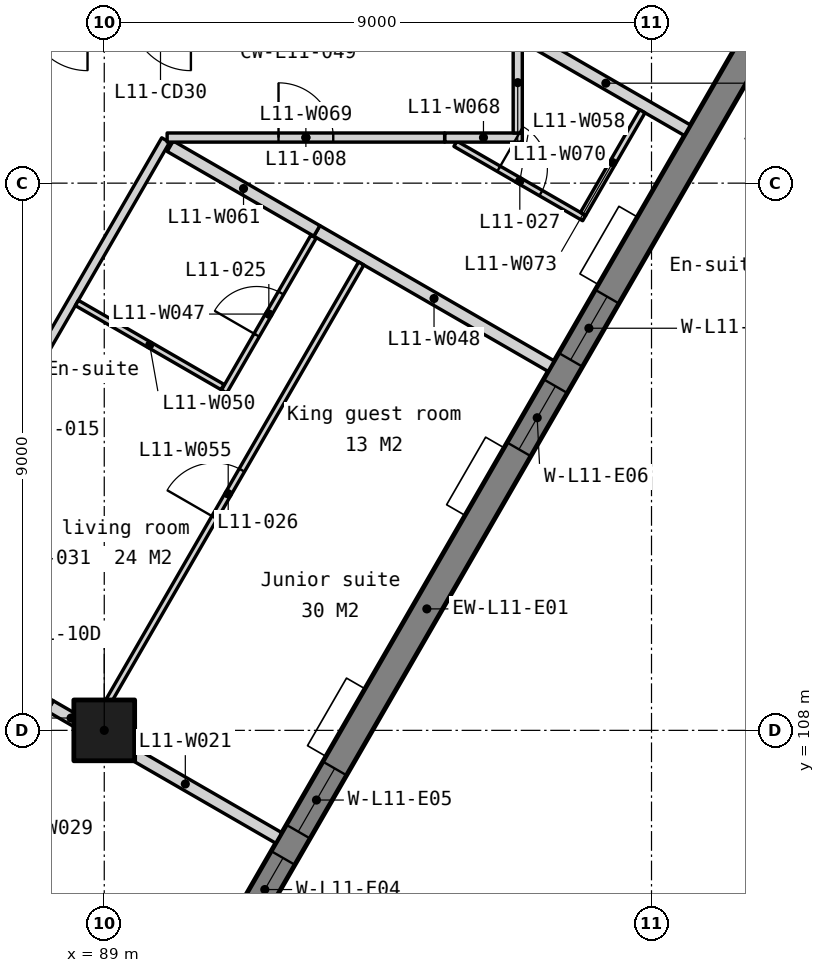
"""IFC4 building model, lengths in metres.
Left out: names, types, materials, properties, quantities, classifications, styles, units other than length and angle.
Written with IfcOpenShell. Run it as: python <this file> out.ifc"""

import sys

from ifc_helpers import new_model, si_unit, direction, frame, frame_2d, origin, origin_2d, place, context, subcontext, project, spatial, polyline, rectangle, outline, extrude, element, fill, save


model = new_model("IFC4")
c1 = context("Model", 3, precision=1e-05, world=origin(), true_north=direction((0.0, 1.0)))
c2 = subcontext(c1, "Body", "Model", "MODEL_VIEW")
j1 = project(units=[si_unit("LENGTHUNIT", "METRE"), si_unit("PLANEANGLEUNIT", "RADIAN")], contexts=[c1])
p1 = place(None, origin())
s1 = spatial("IfcSite", under=j1, at=p1, CompositionType="ELEMENT")
p2 = place(p1, origin())
s2 = spatial("IfcBuilding", under=s1, at=p2, CompositionType="ELEMENT")
p3 = place(p2, frame((0.0, 0.0, 52.5)))
s3 = spatial("IfcBuildingStorey", under=s2, at=p3, CompositionType="ELEMENT", Elevation=52.5)
p4 = place(p3, frame((89.0, 108.0, 0.0), z_axis=(0.0, 0.0, 1.0), x_axis=(1.0, 0.0, 0.0)))
e1 = element("IfcColumn", 1, at=p4, inside=s3, PredefinedType="COLUMN", context=c2, shape_type="SweptSolid", body=[
    extrude(rectangle(XDim=1.0, YDim=1.0, at=origin_2d()), origin(), (0.0, 0.0, 1.0), 3.5),
])
p5 = place(p3, frame((83.105, 90.599, -0.15), z_axis=(0.0, 0.0, 1.0), x_axis=(0.499999201451, 0.866025864826, 0.0)))
e2 = element("IfcWall", 2, at=p5, inside=s3, PredefinedType="SOLIDWALL", context=c2, shape_type="SweptSolid", body=[
    extrude(outline(polyline([(44.8, 0.0), (44.8, 3.5), (0.0, 3.5), (0.0, 0.0), (44.8, 0.0)])), frame((0.0, 0.225, 0.0), z_axis=(0.0, -1.0, 0.0), x_axis=(1.0, 0.0, 0.0)), (0.0, 0.0, 1.0), 0.45),
])
p6 = place(p5, frame((0.722, 0.0, 1.05)))
e3 = element("IfcOpeningElement", 3, at=p6, cuts=e2, PredefinedType="OPENING", context=c2, shape_type="SweptSolid", body=[
    extrude(rectangle(XDim=1.2, YDim=1.5, at=frame_2d((0.6, 0.75))), frame((0.0, 0.235, 0.0), z_axis=(0.0, -1.0, 0.0), x_axis=(1.0, 0.0, 0.0)), (0.0, 0.0, 1.0), 0.47),
])
p7 = place(p5, frame((7.51, 0.0, 1.05)))
e4 = element("IfcOpeningElement", 4, at=p7, cuts=e2, PredefinedType="OPENING", context=c2, shape_type="SweptSolid", body=[
    extrude(rectangle(XDim=1.2, YDim=1.5, at=frame_2d((0.6, 0.75))), frame((0.0, 0.235, 0.0), z_axis=(0.0, -1.0, 0.0), x_axis=(1.0, 0.0, 0.0)), (0.0, 0.0, 1.0), 0.47),
])
p8 = place(p5, frame((9.21, 0.0, 1.05)))
e5 = element("IfcOpeningElement", 5, at=p8, cuts=e2, PredefinedType="OPENING", context=c2, shape_type="SweptSolid", body=[
    extrude(rectangle(XDim=1.2, YDim=1.5, at=frame_2d((0.6, 0.75))), frame((0.0, 0.235, 0.0), z_axis=(0.0, -1.0, 0.0), x_axis=(1.0, 0.0, 0.0)), (0.0, 0.0, 1.0), 0.47),
])
p9 = place(p5, frame((16.47, 0.0, 1.05)))
e6 = element("IfcOpeningElement", 6, at=p9, cuts=e2, PredefinedType="OPENING", context=c2, shape_type="SweptSolid", body=[
    extrude(rectangle(XDim=1.2, YDim=1.5, at=frame_2d((0.6, 0.75))), frame((0.0, 0.235, 0.0), z_axis=(0.0, -1.0, 0.0), x_axis=(1.0, 0.0, 0.0)), (0.0, 0.0, 1.0), 0.47),
])
p10 = place(p5, frame((18.17, 0.0, 1.05)))
e7 = element("IfcOpeningElement", 7, at=p10, cuts=e2, PredefinedType="OPENING", context=c2, shape_type="SweptSolid", body=[
    extrude(rectangle(XDim=1.2, YDim=1.5, at=frame_2d((0.6, 0.75))), frame((0.0, 0.235, 0.0), z_axis=(0.0, -1.0, 0.0), x_axis=(1.0, 0.0, 0.0)), (0.0, 0.0, 1.0), 0.47),
])
p11 = place(p5, frame((25.43, 0.0, 1.05)))
e8 = element("IfcOpeningElement", 8, at=p11, cuts=e2, PredefinedType="OPENING", context=c2, shape_type="SweptSolid", body=[
    extrude(rectangle(XDim=1.2, YDim=1.5, at=frame_2d((0.6, 0.75))), frame((0.0, 0.235, 0.0), z_axis=(0.0, -1.0, 0.0), x_axis=(1.0, 0.0, 0.0)), (0.0, 0.0, 1.0), 0.47),
])
p12 = place(p5, frame((27.13, 0.0, 1.05)))
e9 = element("IfcOpeningElement", 9, at=p12, cuts=e2, PredefinedType="OPENING", context=c2, shape_type="SweptSolid", body=[
    extrude(rectangle(XDim=1.2, YDim=1.5, at=frame_2d((0.6, 0.75))), frame((0.0, 0.235, 0.0), z_axis=(0.0, -1.0, 0.0), x_axis=(1.0, 0.0, 0.0)), (0.0, 0.0, 1.0), 0.47),
])
p13 = place(p5, frame((34.39, 0.0, 1.05)))
e10 = element("IfcOpeningElement", 10, at=p13, cuts=e2, PredefinedType="OPENING", context=c2, shape_type="SweptSolid", body=[
    extrude(rectangle(XDim=1.2, YDim=1.5, at=frame_2d((0.6, 0.75))), frame((0.0, 0.235, 0.0), z_axis=(0.0, -1.0, 0.0), x_axis=(1.0, 0.0, 0.0)), (0.0, 0.0, 1.0), 0.47),
])
p14 = place(p5, frame((36.09, 0.0, 1.05)))
e11 = element("IfcOpeningElement", 11, at=p14, cuts=e2, PredefinedType="OPENING", context=c2, shape_type="SweptSolid", body=[
    extrude(rectangle(XDim=1.2, YDim=1.5, at=frame_2d((0.6, 0.75))), frame((0.0, 0.235, 0.0), z_axis=(0.0, -1.0, 0.0), x_axis=(1.0, 0.0, 0.0)), (0.0, 0.0, 1.0), 0.47),
])
p15 = place(p5, frame((42.878, 0.0, 1.05)))
e12 = element("IfcOpeningElement", 12, at=p15, cuts=e2, PredefinedType="OPENING", context=c2, shape_type="SweptSolid", body=[
    extrude(rectangle(XDim=1.2, YDim=1.5, at=frame_2d((0.6, 0.75))), frame((0.0, 0.235, 0.0), z_axis=(0.0, -1.0, 0.0), x_axis=(1.0, 0.0, 0.0)), (0.0, 0.0, 1.0), 0.47),
])
p16 = place(p3, frame((83.339, 105.983, 0.0), z_axis=(0.0, 0.0, 1.0), x_axis=(0.866023858256, -0.500002676924, 0.0)))
e13 = element("IfcWall", 13, at=p16, inside=s3, PredefinedType="PARTITIONING", context=c2, shape_type="SweptSolid", body=[
    extrude(rectangle(XDim=7.265, YDim=0.2, at=frame_2d((3.633, 0.0))), origin(), (0.0, 0.0, 1.0), 3.35),
])
p17 = place(p3, frame((88.796, 108.005, 0.0), z_axis=(0.0, 0.0, 1.0), x_axis=(0.8660424351, -0.499970499736, 0.0)))
e14 = element("IfcWall", 14, at=p17, inside=s3, PredefinedType="PARTITIONING", context=c2, shape_type="SweptSolid", body=[
    extrude(rectangle(XDim=3.55, YDim=0.2, at=frame_2d((1.775, 0.0))), origin(), (0.0, 0.0, 1.0), 3.35),
])
p18 = place(p3, frame((88.112, 108.4, 0.0), z_axis=(0.0, 0.0, 1.0), x_axis=(0.865989998118, -0.500061319399, 0.0)))
e15 = element("IfcWall", 15, at=p18, inside=s3, PredefinedType="PARTITIONING", context=c2, shape_type="SweptSolid", body=[
    extrude(rectangle(XDim=0.79, YDim=0.2, at=frame_2d((0.395, 0.0))), origin(), (0.0, 0.0, 1.0), 3.35),
])
p19 = place(p3, frame((85.579, 109.863, 0.0), z_axis=(0.0, 0.0, 1.0), x_axis=(0.86601045545, -0.500025890382, 0.0)))
e16 = element("IfcWall", 16, at=p19, inside=s3, PredefinedType="PARTITIONING", context=c2, shape_type="SweptSolid", body=[
    extrude(rectangle(XDim=2.925, YDim=0.2, at=frame_2d((1.462, 0.0))), origin(), (0.0, 0.0, 1.0), 3.35),
])
p20 = place(p3, frame((85.505, 109.906, 0.0), z_axis=(0.0, 0.0, 1.0), x_axis=(0.500017993482, 0.866015014994, 0.0)))
e17 = element("IfcWall", 17, at=p20, inside=s3, PredefinedType="PARTITIONING", context=c2, shape_type="SweptSolid", body=[
    extrude(rectangle(XDim=9.01, YDim=0.15, at=frame_2d((4.505, 0.0))), origin(), (0.0, 0.0, 1.0), 3.35),
])
p21 = place(p20, frame((4.005, 0.0, 0.0)))
e18 = element("IfcOpeningElement", 18, at=p21, cuts=e17, PredefinedType="OPENING", context=c2, shape_type="SweptSolid", body=[
    extrude(rectangle(XDim=1.0, YDim=2.1, at=frame_2d((0.5, 1.05))), frame((0.0, 0.085, 0.0), z_axis=(0.0, -1.0, 0.0), x_axis=(1.0, 0.0, 0.0)), (0.0, 0.0, 1.0), 0.17),
])
p22 = place(p3, frame((90.971, 113.574, 0.0), z_axis=(0.0, 0.0, 1.0), x_axis=(0.499988418424, 0.866032090307, 0.0)))
e19 = element("IfcWall", 19, at=p22, inside=s3, PredefinedType="PARTITIONING", context=c2, shape_type="SweptSolid", body=[
    extrude(rectangle(XDim=2.94, YDim=0.1, at=frame_2d((1.47, 0.0))), origin(), (0.0, 0.0, 1.0), 3.35),
])
p23 = place(p22, frame((1.07, 0.0, 0.0)))
e20 = element("IfcOpeningElement", 20, at=p23, cuts=e19, PredefinedType="OPENING", context=c2, shape_type="SweptSolid", body=[
    extrude(rectangle(XDim=0.8, YDim=2.1, at=frame_2d((0.4, 1.05))), frame((0.0, 0.06, 0.0), z_axis=(0.0, -1.0, 0.0), x_axis=(1.0, 0.0, 0.0)), (0.0, 0.0, 1.0), 0.12),
])
p24 = place(p3, frame((92.497, 116.215, 0.0), z_axis=(0.0, 0.0, 1.0), x_axis=(0.866012907634, -0.500021643343, 0.0)))
e21 = element("IfcWall", 21, at=p24, inside=s3, PredefinedType="PARTITIONING", context=c2, shape_type="SweptSolid", body=[
    extrude(rectangle(XDim=4.45, YDim=0.2, at=frame_2d((2.225, 0.0))), origin(), (0.0, 0.0, 1.0), 3.35),
])
p25 = place(p3, frame((88.55, 115.03, 0.0), z_axis=(0.0, 0.0, 1.0), x_axis=(0.866012076814, -0.50002308228, 0.0)))
e22 = element("IfcWall", 22, at=p25, inside=s3, PredefinedType="PARTITIONING", context=c2, shape_type="SweptSolid", body=[
    extrude(rectangle(XDim=2.765, YDim=0.1, at=frame_2d((1.382, 0.0))), origin(), (0.0, 0.0, 1.0), 3.35),
])
p26 = place(p3, frame((88.851, 108.101, 0.0), z_axis=(0.0, 0.0, 1.0), x_axis=(0.500004234368, 0.866022959057, 0.0)))
e23 = element("IfcWall", 23, at=p26, inside=s3, PredefinedType="PARTITIONING", context=c2, shape_type="SweptSolid", body=[
    extrude(rectangle(XDim=8.75, YDim=0.1, at=frame_2d((4.375, 0.0))), origin(), (0.0, 0.0, 1.0), 3.35),
])
p27 = place(p26, frame((3.925, 0.0, 0.0)))
e24 = element("IfcOpeningElement", 24, at=p27, cuts=e23, PredefinedType="OPENING", context=c2, shape_type="SweptSolid", body=[
    extrude(rectangle(XDim=0.9, YDim=2.1, at=frame_2d((0.45, 1.05))), frame((0.0, 0.06, 0.0), z_axis=(0.0, -1.0, 0.0), x_axis=(1.0, 0.0, 0.0)), (0.0, 0.0, 1.0), 0.12),
])
p28 = place(p3, frame((94.775, 117.647, 0.0), z_axis=(0.0, 0.0, 1.0), x_axis=(0.86604092097, -0.499973122483, 0.0)))
e25 = element("IfcWall", 25, at=p28, inside=s3, PredefinedType="PARTITIONING", context=c2, shape_type="SweptSolid", body=[
    extrude(rectangle(XDim=2.445, YDim=0.1, at=frame_2d((1.223, 0.0))), origin(), (0.0, 0.0, 1.0), 3.35),
])
p29 = place(p28, frame((0.823, 0.0, 0.0)))
e26 = element("IfcOpeningElement", 26, at=p29, cuts=e25, PredefinedType="OPENING", context=c2, shape_type="SweptSolid", body=[
    extrude(rectangle(XDim=0.8, YDim=2.1, at=frame_2d((0.4, 1.05))), frame((0.0, 0.06, 0.0), z_axis=(0.0, -1.0, 0.0), x_axis=(1.0, 0.0, 0.0)), (0.0, 0.0, 1.0), 0.12),
])
p30 = place(p3, frame((90.085, 117.608, 0.0), z_axis=(0.0, 0.0, 1.0), x_axis=(0.866011863948, -0.500023450952, 0.0)))
e27 = element("IfcWall", 27, at=p30, inside=s3, PredefinedType="PARTITIONING", context=c2, shape_type="SweptSolid", body=[
    extrude(rectangle(XDim=2.785, YDim=0.2, at=frame_2d((1.393, 0.0))), origin(), (0.0, 0.0, 1.0), 3.35),
])
p31 = place(p3, frame((94.598, 117.75, 0.0), z_axis=(0.0, 0.0, 1.0), x_axis=(1.0, 0.0, 0.0)))
e28 = element("IfcWall", 28, at=p31, inside=s3, PredefinedType="PARTITIONING", context=c2, shape_type="SweptSolid", body=[
    extrude(rectangle(XDim=1.277, YDim=0.15, at=frame_2d((0.639, 0.0))), origin(), (0.0, 0.0, 1.0), 3.35),
])
p32 = place(p3, frame((90.034, 117.75, 0.0), z_axis=(0.0, 0.0, 1.0), x_axis=(1.0, 0.0, 0.0)))
e29 = element("IfcWall", 29, at=p32, inside=s3, PredefinedType="PARTITIONING", context=c2, shape_type="SweptSolid", body=[
    extrude(rectangle(XDim=4.564, YDim=0.15, at=frame_2d((2.282, 0.0))), origin(), (0.0, 0.0, 1.0), 3.35),
])
p33 = place(p32, frame((1.832, 0.0, 0.0)))
e30 = element("IfcOpeningElement", 30, at=p33, cuts=e29, PredefinedType="OPENING", context=c2, shape_type="SweptSolid", body=[
    extrude(rectangle(XDim=0.9, YDim=2.1, at=frame_2d((0.45, 1.05))), frame((0.0, 0.085, 0.0), z_axis=(0.0, -1.0, 0.0), x_axis=(1.0, 0.0, 0.0)), (0.0, 0.0, 1.0), 0.17),
])
p34 = place(p3, frame((95.8, 117.825, 0.0), z_axis=(0.0, 0.0, 1.0), x_axis=(0.0, 1.0, 0.0)))
e31 = element("IfcWall", 31, at=p34, inside=s3, PredefinedType="PARTITIONING", context=c2, shape_type="SweptSolid", body=[
    extrude(rectangle(XDim=1.656, YDim=0.15, at=frame_2d((0.828, 0.0))), origin(), (0.0, 0.0, 1.0), 3.35),
])
p35 = place(p3, frame((95.908, 119.418, 0.0), z_axis=(0.0, 0.0, 1.0), x_axis=(0.866051688794, -0.499954470265, 0.0)))
e32 = element("IfcWall", 32, at=p35, inside=s3, PredefinedType="PARTITIONING", context=c2, shape_type="SweptSolid", body=[
    extrude(rectangle(XDim=3.097, YDim=0.2, at=frame_2d((1.548, 0.0))), origin(), (0.0, 0.0, 1.0), 3.35),
])
p36 = place(p3, frame((96.875, 116.493, 0.0), z_axis=(0.0, 0.0, 1.0), x_axis=(0.500043961785, 0.866000020948, 0.0)))
e33 = element("IfcWall", 33, at=p36, inside=s3, PredefinedType="PARTITIONING", context=c2, shape_type="SweptSolid", body=[
    extrude(rectangle(XDim=1.95, YDim=0.1, at=frame_2d((0.975, 0.0))), origin(), (0.0, 0.0, 1.0), 3.35),
])
p37 = place(p9, origin())
e34 = element("IfcWindow", 34, at=p37, inside=s3, PartitioningType="SINGLE_PANEL", PredefinedType="WINDOW", context=c2, shape_type="SweptSolid", body=[
    extrude(rectangle(XDim=1.2, YDim=1.5, at=frame_2d((0.6, 0.75))), frame((0.0, 0.03, 0.0), z_axis=(0.0, -1.0, 0.0), x_axis=(1.0, 0.0, 0.0)), (0.0, 0.0, 1.0), 0.06),
])
fill(e6, e34)
p38 = place(p10, origin())
e35 = element("IfcWindow", 35, at=p38, inside=s3, PartitioningType="SINGLE_PANEL", PredefinedType="WINDOW", context=c2, shape_type="SweptSolid", body=[
    extrude(rectangle(XDim=1.2, YDim=1.5, at=frame_2d((0.6, 0.75))), frame((0.0, 0.03, 0.0), z_axis=(0.0, -1.0, 0.0), x_axis=(1.0, 0.0, 0.0)), (0.0, 0.0, 1.0), 0.06),
])
fill(e7, e35)
p39 = place(p11, origin())
e36 = element("IfcWindow", 36, at=p39, inside=s3, PartitioningType="SINGLE_PANEL", PredefinedType="WINDOW", context=c2, shape_type="SweptSolid", body=[
    extrude(rectangle(XDim=1.2, YDim=1.5, at=frame_2d((0.6, 0.75))), frame((0.0, 0.03, 0.0), z_axis=(0.0, -1.0, 0.0), x_axis=(1.0, 0.0, 0.0)), (0.0, 0.0, 1.0), 0.06),
])
fill(e8, e36)
p40 = place(p12, origin())
e37 = element("IfcWindow", 37, at=p40, inside=s3, PartitioningType="SINGLE_PANEL", PredefinedType="WINDOW", context=c2, shape_type="SweptSolid", body=[
    extrude(rectangle(XDim=1.2, YDim=1.5, at=frame_2d((0.6, 0.75))), frame((0.0, 0.03, 0.0), z_axis=(0.0, -1.0, 0.0), x_axis=(1.0, 0.0, 0.0)), (0.0, 0.0, 1.0), 0.06),
])
fill(e9, e37)
p41 = place(p33, origin())
e38 = element("IfcDoor", 38, at=p41, inside=s3, OperationType="SINGLE_SWING_LEFT", PredefinedType="DOOR", context=c2, shape_type="SweptSolid", body=[
    extrude(rectangle(XDim=0.9, YDim=2.1, at=frame_2d((0.45, 1.05))), frame((0.0, 0.025, 0.0), z_axis=(0.0, -1.0, 0.0), x_axis=(1.0, 0.0, 0.0)), (0.0, 0.0, 1.0), 0.05),
])
fill(e30, e38)
p42 = place(p23, origin())
e39 = element("IfcDoor", 39, at=p42, inside=s3, OperationType="SINGLE_SWING_LEFT", PredefinedType="DOOR", context=c2, shape_type="SweptSolid", body=[
    extrude(rectangle(XDim=0.8, YDim=2.1, at=frame_2d((0.4, 1.05))), frame((0.0, 0.025, 0.0), z_axis=(0.0, -1.0, 0.0), x_axis=(1.0, 0.0, 0.0)), (0.0, 0.0, 1.0), 0.05),
])
fill(e20, e39)
p43 = place(p27, origin())
e40 = element("IfcDoor", 40, at=p43, inside=s3, OperationType="SINGLE_SWING_LEFT", PredefinedType="DOOR", context=c2, shape_type="SweptSolid", body=[
    extrude(rectangle(XDim=0.9, YDim=2.1, at=frame_2d((0.45, 1.05))), frame((0.0, 0.025, 0.0), z_axis=(0.0, -1.0, 0.0), x_axis=(1.0, 0.0, 0.0)), (0.0, 0.0, 1.0), 0.05),
])
fill(e24, e40)
p44 = place(p29, origin())
e41 = element("IfcDoor", 41, at=p44, inside=s3, OperationType="SINGLE_SWING_LEFT", PredefinedType="DOOR", context=c2, shape_type="SweptSolid", body=[
    extrude(rectangle(XDim=0.8, YDim=2.1, at=frame_2d((0.4, 1.05))), frame((0.0, 0.025, 0.0), z_axis=(0.0, -1.0, 0.0), x_axis=(1.0, 0.0, 0.0)), (0.0, 0.0, 1.0), 0.05),
])
fill(e26, e41)
save(model, sys.argv[1])
